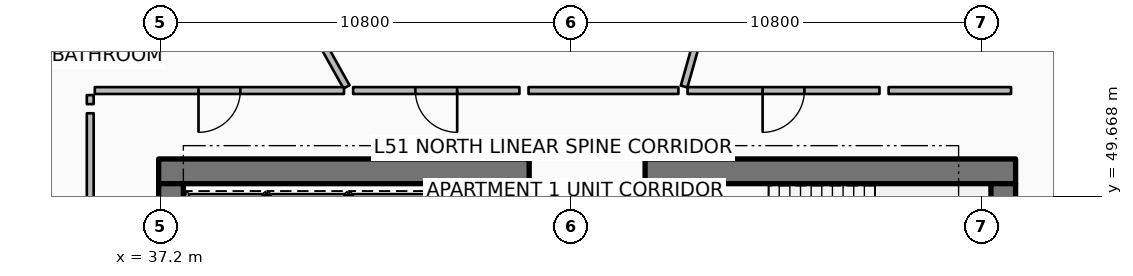
"""IFC4 building model, lengths in metres.
Left out: names, types, materials, properties, quantities, classifications, styles, units other than length and angle.
Written with IfcOpenShell. Run it as: python <this file> out.ifc"""

import sys

from ifc_helpers import new_model, si_unit, direction, frame, frame_2d, origin, place, context, subcontext, project, spatial, rectangle, extrude, element, fill, save


model = new_model("IFC4")
c1 = context("Model", 3, precision=1e-05, world=origin(), true_north=direction((0.0, 1.0)))
c2 = subcontext(c1, "Body", "Model", "MODEL_VIEW")
j1 = project(units=[si_unit("LENGTHUNIT", "METRE"), si_unit("PLANEANGLEUNIT", "RADIAN")], contexts=[c1])
p1 = place(None, origin())
s1 = spatial("IfcSite", under=j1, at=p1, CompositionType="ELEMENT")
p2 = place(p1, origin())
s2 = spatial("IfcBuilding", under=s1, at=p2, CompositionType="ELEMENT")
p3 = place(p2, frame((0.0, 0.0, 202.8)))
s3 = spatial("IfcBuildingStorey", under=s2, at=p3, CompositionType="ELEMENT", Elevation=202.8)
for number, where, z_axis, x_axis in (
    (1, (37.15, 50.325, 0.0), (0.0, 0.0, 1.0), (1.0, 0.0, 0.0)),
    (2, (49.95, 50.325, 0.0), (0.0, 0.0, 1.0), (1.0, 0.0, 0.0)),
):
    element("IfcWall", number, at=place(p3, frame(where, z_axis=z_axis, x_axis=x_axis)), inside=s3, PredefinedType="SHEAR", context=c2, shape_type="SweptSolid", body=[
        extrude(rectangle(XDim=9.75, YDim=0.65, at=frame_2d((4.875, 0.0))), origin(), (0.0, 0.0, 1.0), 3.75),
    ])
for number, where, z_axis, x_axis in (
    (3, (37.475, 34.0, 0.0), (0.0, 0.0, 1.0), (0.0, 1.0, 0.0)),
    (4, (59.375, 34.0, 0.0), (0.0, 0.0, 1.0), (0.0, 1.0, 0.0)),
):
    element("IfcWall", number, at=place(p3, frame(where, z_axis=z_axis, x_axis=x_axis)), inside=s3, PredefinedType="SHEAR", context=c2, shape_type="SweptSolid", body=[
        extrude(rectangle(XDim=16.0, YDim=0.65, at=frame_2d((8.0, 0.0))), origin(), (0.0, 0.0, 1.0), 3.75),
    ])
p4 = place(p3, frame((51.31, 46.5, 0.0), z_axis=(0.0, 0.0, 1.0), x_axis=(0.0, 1.0, 0.0)))
e5 = element("IfcWall", 5, at=p4, inside=s3, PredefinedType="SHEAR", context=c2, shape_type="SweptSolid", body=[
    extrude(rectangle(XDim=3.5, YDim=0.28, at=frame_2d((1.75, 0.0))), origin(), (0.0, 0.0, 1.0), 3.75),
])
for number, where, z_axis, x_axis in (
    (6, (39.975, 48.095, 0.0), (0.0, 0.0, 1.0), (0.0, 1.0, 0.0)),
    (7, (42.125, 48.095, 0.0), (0.0, 0.0, 1.0), (0.0, 1.0, 0.0)),
    (8, (44.275, 48.095, 0.0), (0.0, 0.0, 1.0), (0.0, 1.0, 0.0)),
):
    element("IfcWall", number, at=place(p3, frame(where, z_axis=z_axis, x_axis=x_axis)), inside=s3, PredefinedType="PARTITIONING", context=c2, shape_type="SweptSolid", body=[
        extrude(rectangle(XDim=1.61, YDim=0.16, at=frame_2d((0.805, 0.0))), origin(), (0.0, 0.0, 1.0), 3.5),
    ])
p5 = place(p3, frame((46.58, 48.045, 0.0), z_axis=(0.0, 0.0, 1.0), x_axis=(0.0, 1.0, 0.0)))
e9 = element("IfcWall", 9, at=p5, inside=s3, PredefinedType="PARTITIONING", context=c2, shape_type="SweptSolid", body=[
    extrude(rectangle(XDim=1.71, YDim=0.16, at=frame_2d((0.855, 0.0))), origin(), (0.0, 0.0, 1.0), 3.5),
])
p6 = place(p3, frame((50.977, 52.556, 0.0), z_axis=(0.0, 0.0, 1.0), x_axis=(0.271443307373, 0.962454430548, 0.0)))
e10 = element("IfcWall", 10, at=p6, inside=s3, PredefinedType="PARTITIONING", context=c2, shape_type="SweptSolid", body=[
    extrude(rectangle(XDim=13.759, YDim=0.18, at=frame_2d((6.88, 0.0))), origin(), (0.0, 0.0, 1.0), 2.94),
])
p7 = place(p3, frame((42.094, 52.546, 0.0), z_axis=(0.0, 0.0, 1.0), x_axis=(-0.488614041717, 0.872500039104, 0.0)))
e11 = element("IfcWall", 11, at=p7, inside=s3, PredefinedType="PARTITIONING", context=c2, shape_type="SweptSolid", body=[
    extrude(rectangle(XDim=10.448, YDim=0.18, at=frame_2d((5.224, 0.0))), origin(), (0.0, 0.0, 1.0), 2.94),
])
p8 = place(p3, frame((46.643, 52.45, 0.0), z_axis=(0.0, 0.0, 1.0), x_axis=(-1.0, 0.0, 0.0)))
e12 = element("IfcWall", 12, at=p8, inside=s3, PredefinedType="PARTITIONING", context=c2, shape_type="SweptSolid", body=[
    extrude(rectangle(XDim=4.376, YDim=0.18, at=frame_2d((2.188, 0.0))), origin(), (0.0, 0.0, 1.0), 2.94),
])
p9 = place(p8, frame((1.638, 0.0, 0.0)))
e13 = element("IfcOpeningElement", 13, at=p9, cuts=e12, PredefinedType="OPENING", context=c2, shape_type="SweptSolid", body=[
    extrude(rectangle(XDim=1.1, YDim=2.1, at=frame_2d((0.55, 1.05))), frame((0.0, 0.1, 0.0), z_axis=(0.0, -1.0, 0.0), x_axis=(1.0, 0.0, 0.0)), (0.0, 0.0, 1.0), 0.2),
])
p10 = place(p3, frame((50.827, 52.45, 0.0), z_axis=(0.0, 0.0, 1.0), x_axis=(-1.0, 0.0, 0.0)))
e14 = element("IfcWall", 14, at=p10, inside=s3, PredefinedType="PARTITIONING", context=c2, shape_type="SweptSolid", body=[
    extrude(rectangle(XDim=3.944, YDim=0.18, at=frame_2d((1.972, 0.0))), origin(), (0.0, 0.0, 1.0), 2.94),
])
p11 = place(p3, frame((42.028, 52.45, 0.0), z_axis=(0.0, 0.0, 1.0), x_axis=(-1.0, 0.0, 0.0)))
e15 = element("IfcWall", 15, at=p11, inside=s3, PredefinedType="PARTITIONING", context=c2, shape_type="SweptSolid", body=[
    extrude(rectangle(XDim=6.558, YDim=0.18, at=frame_2d((3.279, 0.0))), origin(), (0.0, 0.0, 1.0), 2.94),
])
p12 = place(p11, frame((2.729, 0.0, 0.0)))
e16 = element("IfcOpeningElement", 16, at=p12, cuts=e15, PredefinedType="OPENING", context=c2, shape_type="SweptSolid", body=[
    extrude(rectangle(XDim=1.1, YDim=2.1, at=frame_2d((0.55, 1.05))), frame((0.0, 0.1, 0.0), z_axis=(0.0, -1.0, 0.0), x_axis=(1.0, 0.0, 0.0)), (0.0, 0.0, 1.0), 0.2),
])
p13 = place(p3, frame((35.35, 52.33, 0.0), z_axis=(0.0, 0.0, 1.0), x_axis=(0.0, -1.0, 0.0)))
e17 = element("IfcWall", 17, at=p13, inside=s3, PredefinedType="PARTITIONING", context=c2, shape_type="SweptSolid", body=[
    extrude(rectangle(XDim=0.238, YDim=0.18, at=frame_2d((0.119, 0.0))), origin(), (0.0, 0.0, 1.0), 2.94),
])
p14 = place(p3, frame((35.35, 51.853, 0.0), z_axis=(0.0, 0.0, 1.0), x_axis=(0.0, -1.0, 0.0)))
e18 = element("IfcWall", 18, at=p14, inside=s3, PredefinedType="PARTITIONING", context=c2, shape_type="SweptSolid", body=[
    extrude(rectangle(XDim=6.165, YDim=0.18, at=frame_2d((3.083, 0.0))), origin(), (0.0, 0.0, 1.0), 2.94),
])
p15 = place(p3, frame((56.118, 52.45, 0.0), z_axis=(0.0, 0.0, 1.0), x_axis=(-1.0, 0.0, 0.0)))
e19 = element("IfcWall", 19, at=p15, inside=s3, PredefinedType="PARTITIONING", context=c2, shape_type="SweptSolid", body=[
    extrude(rectangle(XDim=5.051, YDim=0.18, at=frame_2d((2.525, 0.0))), origin(), (0.0, 0.0, 1.0), 2.94),
])
p16 = place(p15, frame((1.975, 0.0, 0.0)))
e20 = element("IfcOpeningElement", 20, at=p16, cuts=e19, PredefinedType="OPENING", context=c2, shape_type="SweptSolid", body=[
    extrude(rectangle(XDim=1.1, YDim=2.1, at=frame_2d((0.55, 1.05))), frame((0.0, 0.1, 0.0), z_axis=(0.0, -1.0, 0.0), x_axis=(1.0, 0.0, 0.0)), (0.0, 0.0, 1.0), 0.2),
])
p17 = place(p3, frame((59.58, 52.45, 0.0), z_axis=(0.0, 0.0, 1.0), x_axis=(-1.0, 0.0, 0.0)))
e21 = element("IfcWall", 21, at=p17, inside=s3, PredefinedType="PARTITIONING", context=c2, shape_type="SweptSolid", body=[
    extrude(rectangle(XDim=3.222, YDim=0.18, at=frame_2d((1.611, 0.0))), origin(), (0.0, 0.0, 1.0), 2.94),
])
p18 = place(p3, frame((62.853, 53.306, 0.0), z_axis=(0.0, 0.0, 1.0), x_axis=(-0.699562743434, 0.714571177699, 0.0)))
e22 = element("IfcWall", 22, at=p18, inside=s3, PredefinedType="PARTITIONING", context=c2, shape_type="SweptSolid", body=[
    extrude(rectangle(XDim=4.604, YDim=0.125, at=frame_2d((2.302, 0.0))), origin(), (0.0, 0.0, 1.0), 2.94),
])
p19 = place(p18, frame((1.852, 0.0, 0.0)))
e23 = element("IfcOpeningElement", 23, at=p19, cuts=e22, PredefinedType="OPENING", context=c2, shape_type="SweptSolid", body=[
    extrude(rectangle(XDim=0.9, YDim=2.08, at=frame_2d((0.45, 1.04))), frame((0.0, 0.073, 0.0), z_axis=(0.0, -1.0, 0.0), x_axis=(1.0, 0.0, 0.0)), (0.0, 0.0, 1.0), 0.145),
])
p20 = place(p9, origin())
e24 = element("IfcDoor", 24, at=p20, inside=s3, OperationType="SINGLE_SWING_LEFT", PredefinedType="DOOR", context=c2, shape_type="SweptSolid", body=[
    extrude(rectangle(XDim=1.1, YDim=2.1, at=frame_2d((0.55, 1.05))), frame((0.0, 0.025, 0.0), z_axis=(0.0, -1.0, 0.0), x_axis=(1.0, 0.0, 0.0)), (0.0, 0.0, 1.0), 0.05),
])
fill(e13, e24)
p21 = place(p12, origin())
e25 = element("IfcDoor", 25, at=p21, inside=s3, OperationType="SINGLE_SWING_RIGHT", PredefinedType="DOOR", context=c2, shape_type="SweptSolid", body=[
    extrude(rectangle(XDim=1.1, YDim=2.1, at=frame_2d((0.55, 1.05))), frame((0.0, 0.025, 0.0), z_axis=(0.0, -1.0, 0.0), x_axis=(1.0, 0.0, 0.0)), (0.0, 0.0, 1.0), 0.05),
])
fill(e16, e25)
p22 = place(p16, origin())
e26 = element("IfcDoor", 26, at=p22, inside=s3, OperationType="SINGLE_SWING_RIGHT", PredefinedType="DOOR", context=c2, shape_type="SweptSolid", body=[
    extrude(rectangle(XDim=1.1, YDim=2.1, at=frame_2d((0.55, 1.05))), frame((0.0, 0.025, 0.0), z_axis=(0.0, -1.0, 0.0), x_axis=(1.0, 0.0, 0.0)), (0.0, 0.0, 1.0), 0.05),
])
fill(e20, e26)
save(model, sys.argv[1])
